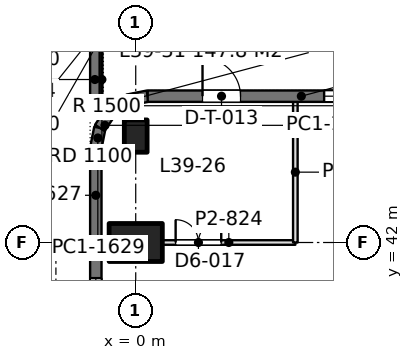
"""IFC4 building model, lengths in metres.
Left out: names, types, materials, properties, quantities, classifications, styles, units other than length and angle.
Written with IfcOpenShell. Run it as: python <this file> out.ifc"""

import sys

from ifc_helpers import new_model, si_unit, direction, frame, frame_2d, origin, origin_2d, place, context, subcontext, project, spatial, rectangle, extrude, element, fill, save


model = new_model("IFC4")
c1 = context("Model", 3, precision=1e-05, world=origin(), true_north=direction((0.0, 1.0)))
c2 = subcontext(c1, "Body", "Model", "MODEL_VIEW")
j1 = project(units=[si_unit("LENGTHUNIT", "METRE"), si_unit("PLANEANGLEUNIT", "RADIAN")], contexts=[c1])
p1 = place(None, origin())
s1 = spatial("IfcSite", under=j1, at=p1, CompositionType="ELEMENT")
p2 = place(p1, origin())
s2 = spatial("IfcBuilding", under=s1, at=p2, CompositionType="ELEMENT")
p3 = place(p2, frame((0.0, 0.0, 173.4)))
s3 = spatial("IfcBuildingStorey", under=s2, at=p3, CompositionType="ELEMENT", Elevation=173.4)
p4 = place(p3, frame((0.0, 42.0, 0.0), z_axis=(0.0, 0.0, 1.0), x_axis=(0.0, 1.0, 0.0)))
e1 = element("IfcColumn", 1, at=p4, inside=s3, PredefinedType="COLUMN", context=c2, shape_type="SweptSolid", body=[
    extrude(rectangle(XDim=1.0, YDim=1.4, at=origin_2d()), origin(), (0.0, 0.0, 1.0), 4.2),
])
p5 = place(p3, frame((0.0, 44.8, -0.36), z_axis=(0.0, 0.0, 1.0), x_axis=(1.0, 0.0, 0.0)))
e2 = element("IfcColumn", 2, at=p5, inside=s3, PredefinedType="COLUMN", context=c2, shape_type="SweptSolid", body=[
    extrude(rectangle(XDim=0.6, YDim=0.85, at=origin_2d()), origin(), (0.0, 0.0, 1.0), 4.56),
])
p6 = place(p3, frame((-1.05, 37.725, 0.0), z_axis=(0.0, 0.0, 1.0), x_axis=(0.0, 1.0, 0.0)))
e3 = element("IfcWall", 3, at=p6, inside=s3, PredefinedType="SOLIDWALL", context=c2, shape_type="SweptSolid", body=[
    extrude(rectangle(XDim=4.275, YDim=0.3, at=frame_2d((2.137, 0.0))), origin(), (0.0, 0.0, 1.0), 4.05),
])
p7 = place(p6, frame((0.938, 0.0, 0.9)))
e4 = element("IfcOpeningElement", 4, at=p7, cuts=e3, PredefinedType="OPENING", context=c2, shape_type="SweptSolid", body=[
    extrude(rectangle(XDim=2.4, YDim=1.9, at=frame_2d((1.2, 0.95))), frame((0.0, 0.16, 0.0), z_axis=(0.0, -1.0, 0.0), x_axis=(1.0, 0.0, 0.0)), (0.0, 0.0, 1.0), 0.32),
])
p8 = place(p3, frame((-1.05, 42.0, 0.0), z_axis=(0.0, 0.0, 1.0), x_axis=(0.0, 1.0, 0.0)))
e5 = element("IfcWall", 5, at=p8, inside=s3, PredefinedType="SOLIDWALL", context=c2, shape_type="SweptSolid", body=[
    extrude(rectangle(XDim=2.485, YDim=0.3, at=frame_2d((1.243, 0.0))), origin(), (0.0, 0.0, 1.0), 4.05),
])
p9 = place(p3, frame((-1.05, 44.485, 0.0), z_axis=(0.0, 0.0, 1.0), x_axis=(0.195073962632, 0.980788534345, 0.0)))
e6 = element("IfcWall", 6, at=p9, inside=s3, PredefinedType="SOLIDWALL", context=c2, shape_type="SweptSolid", body=[
    extrude(rectangle(XDim=0.541, YDim=0.3, at=frame_2d((0.271, 0.0))), origin(), (0.0, 0.0, 1.0), 4.05),
])
p10 = place(p3, frame((-0.945, 45.015, 0.0), z_axis=(0.0, 0.0, 1.0), x_axis=(0.55534295404, 0.831621430339, 0.0)))
e7 = element("IfcWall", 7, at=p10, inside=s3, PredefinedType="SOLIDWALL", context=c2, shape_type="SweptSolid", body=[
    extrude(rectangle(XDim=0.526, YDim=0.3, at=frame_2d((0.263, 0.0))), origin(), (0.0, 0.0, 1.0), 4.05),
])
p11 = place(p3, frame((-0.653, 45.453, 0.0), z_axis=(0.0, 0.0, 1.0), x_axis=(0.831692711774, 0.555236195849, 0.0)))
e8 = element("IfcWall", 8, at=p11, inside=s3, PredefinedType="SOLIDWALL", context=c2, shape_type="SweptSolid", body=[
    extrude(rectangle(XDim=0.525, YDim=0.3, at=frame_2d((0.263, 0.0))), origin(), (0.0, 0.0, 1.0), 4.05),
])
p12 = place(p3, frame((-0.216, 45.744, 0.0), z_axis=(0.0, 0.0, 1.0), x_axis=(0.980702050465, 0.1955082817, 0.0)))
e9 = element("IfcWall", 9, at=p12, inside=s3, PredefinedType="SOLIDWALL", context=c2, shape_type="SweptSolid", body=[
    extrude(rectangle(XDim=0.541, YDim=0.3, at=frame_2d((0.271, 0.0))), origin(), (0.0, 0.0, 1.0), 4.05),
])
p13 = place(p3, frame((0.315, 45.85, 0.0), z_axis=(0.0, 0.0, 1.0), x_axis=(1.0, 0.0, 0.0)))
e10 = element("IfcWall", 10, at=p13, inside=s3, PredefinedType="SOLIDWALL", context=c2, shape_type="SweptSolid", body=[
    extrude(rectangle(XDim=8.085, YDim=0.3, at=frame_2d((4.042, 0.0))), origin(), (0.0, 0.0, 1.0), 4.05),
])
p14 = place(p13, frame((4.643, 0.0, 0.9)))
e11 = element("IfcOpeningElement", 11, at=p14, cuts=e10, PredefinedType="OPENING", context=c2, shape_type="SweptSolid", body=[
    extrude(rectangle(XDim=3.0, YDim=1.9, at=frame_2d((1.5, 0.95))), frame((0.0, 0.16, 0.0), z_axis=(0.0, -1.0, 0.0), x_axis=(1.0, 0.0, 0.0)), (0.0, 0.0, 1.0), 0.32),
])
p15 = place(p13, frame((1.443, 0.0, 0.0)))
e12 = element("IfcOpeningElement", 12, at=p15, cuts=e10, PredefinedType="OPENING", context=c2, shape_type="SweptSolid", body=[
    extrude(rectangle(XDim=1.0, YDim=2.4, at=frame_2d((0.5, 1.2))), frame((0.0, 0.16, 0.0), z_axis=(0.0, -1.0, 0.0), x_axis=(1.0, 0.0, 0.0)), (0.0, 0.0, 1.0), 0.32),
])
p16 = place(p3, frame((-1.075, 45.277, -0.16), z_axis=(0.0, 0.0, 1.0), x_axis=(0.0, 1.0, 0.0)))
e13 = element("IfcWall", 13, at=p16, inside=s3, PredefinedType="PARAPET", context=c2, shape_type="SweptSolid", body=[
    extrude(rectangle(XDim=2.023, YDim=0.25, at=frame_2d((1.012, 0.0))), origin(), (0.0, 0.0, 1.0), 1.26),
])
p17 = place(p3, frame((0.699, 42.0, 0.0), z_axis=(0.0, 0.0, 1.0), x_axis=(1.0, 0.0, 0.0)))
e14 = element("IfcWall", 14, at=p17, inside=s3, PredefinedType="PARTITIONING", context=c2, shape_type="SweptSolid", body=[
    extrude(rectangle(XDim=3.501, YDim=0.12, at=frame_2d((1.75, 0.0))), origin(), (0.0, 0.0, 1.0), 3.55),
])
p18 = place(p17, frame((0.351, 0.0, 0.0)))
e15 = element("IfcOpeningElement", 15, at=p18, cuts=e14, PredefinedType="OPENING", context=c2, shape_type="SweptSolid", body=[
    extrude(rectangle(XDim=1.2, YDim=2.2, at=frame_2d((0.6, 1.1))), frame((0.0, 0.07, 0.0), z_axis=(0.0, -1.0, 0.0), x_axis=(1.0, 0.0, 0.0)), (0.0, 0.0, 1.0), 0.14),
])
p19 = place(p3, frame((4.2, 42.0, 0.0), z_axis=(0.0, 0.0, 1.0), x_axis=(0.0, 1.0, 0.0)))
e16 = element("IfcWall", 16, at=p19, inside=s3, PredefinedType="PARTITIONING", context=c2, shape_type="SweptSolid", body=[
    extrude(rectangle(XDim=3.702, YDim=0.12, at=frame_2d((1.851, 0.0))), origin(), (0.0, 0.0, 1.0), 3.55),
])
p20 = place(p7, origin())
e17 = element("IfcWindow", 17, at=p20, inside=s3, PartitioningType="SINGLE_PANEL", PredefinedType="WINDOW", context=c2, shape_type="SweptSolid", body=[
    extrude(rectangle(XDim=2.4, YDim=1.9, at=frame_2d((1.2, 0.95))), frame((0.0, 0.03, 0.0), z_axis=(0.0, -1.0, 0.0), x_axis=(1.0, 0.0, 0.0)), (0.0, 0.0, 1.0), 0.06),
])
fill(e4, e17)
p21 = place(p14, origin())
e18 = element("IfcWindow", 18, at=p21, inside=s3, PartitioningType="SINGLE_PANEL", PredefinedType="WINDOW", context=c2, shape_type="SweptSolid", body=[
    extrude(rectangle(XDim=3.0, YDim=1.9, at=frame_2d((1.5, 0.95))), frame((0.0, 0.03, 0.0), z_axis=(0.0, -1.0, 0.0), x_axis=(1.0, 0.0, 0.0)), (0.0, 0.0, 1.0), 0.06),
])
fill(e11, e18)
p22 = place(p15, origin())
e19 = element("IfcDoor", 19, at=p22, inside=s3, OperationType="SINGLE_SWING_LEFT", PredefinedType="DOOR", context=c2, shape_type="SweptSolid", body=[
    extrude(rectangle(XDim=1.0, YDim=2.4, at=frame_2d((0.5, 1.2))), frame((0.0, 0.025, 0.0), z_axis=(0.0, -1.0, 0.0), x_axis=(1.0, 0.0, 0.0)), (0.0, 0.0, 1.0), 0.05),
])
fill(e12, e19)
p23 = place(p18, origin())
e20 = element("IfcDoor", 20, at=p23, inside=s3, OperationType="DOUBLE_DOOR_SINGLE_SWING_OPPOSITE_LEFT", PredefinedType="DOOR", context=c2, shape_type="SweptSolid", body=[
    extrude(rectangle(XDim=1.2, YDim=2.2, at=frame_2d((0.6, 1.1))), frame((0.0, 0.025, 0.0), z_axis=(0.0, -1.0, 0.0), x_axis=(1.0, 0.0, 0.0)), (0.0, 0.0, 1.0), 0.05),
])
fill(e15, e20)
save(model, sys.argv[1])
